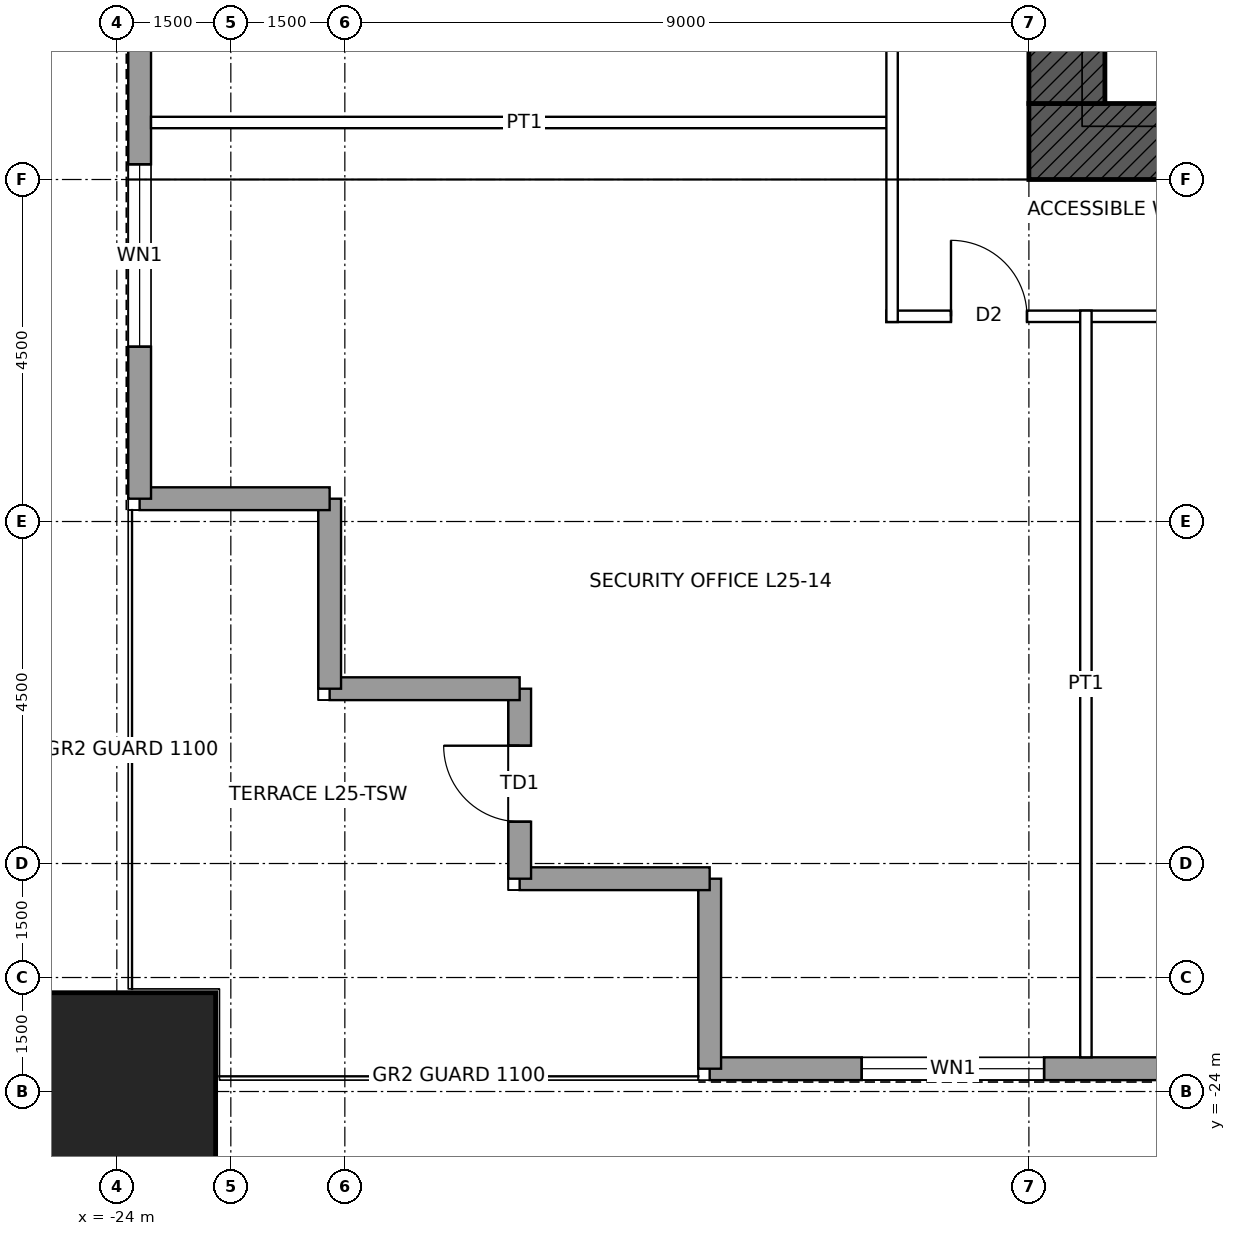
"""IFC4 building model, lengths in metres.
Left out: names, types, materials, properties, quantities, classifications, styles, units other than length and angle.
Written with IfcOpenShell. Run it as: python <this file> out.ifc"""

import sys

from ifc_helpers import new_model, si_unit, direction, frame, frame_2d, origin, origin_2d, place, context, subcontext, project, spatial, rectangle, hollow_rectangle, extrude, element, fill, save


model = new_model("IFC4")
c1 = context("Model", 3, precision=1e-05, world=origin(), true_north=direction((0.0, 1.0)))
c2 = subcontext(c1, "Body", "Model", "MODEL_VIEW")
j1 = project(units=[si_unit("LENGTHUNIT", "METRE"), si_unit("PLANEANGLEUNIT", "RADIAN")], contexts=[c1])
p1 = place(None, origin())
s1 = spatial("IfcSite", under=j1, at=p1, CompositionType="ELEMENT")
p2 = place(p1, origin())
s2 = spatial("IfcBuilding", under=s1, at=p2, CompositionType="ELEMENT")
p3 = place(p2, frame((0.0, 0.0, 126.9)))
s3 = spatial("IfcBuildingStorey", under=s2, at=p3, CompositionType="ELEMENT", Elevation=126.9)
p4 = place(p3, frame((-24.0, -24.0, 0.0), z_axis=(0.0, 0.0, 1.0), x_axis=(1.0, 0.0, 0.0)))
e1 = element("IfcColumn", 1, at=p4, inside=s3, PredefinedType="COLUMN", context=c2, shape_type="SweptSolid", body=[
    extrude(hollow_rectangle(XDim=2.6, YDim=2.6, WallThickness=0.13, at=origin_2d()), origin(), (0.0, 0.0, 1.0), 4.5),
])
p5 = place(p3, frame((12.0, -11.5, 0.0), z_axis=(0.0, 0.0, 1.0), x_axis=(-1.0, 0.0, 0.0)))
e2 = element("IfcWall", 2, at=p5, inside=s3, PredefinedType="SHEAR", context=c2, shape_type="SweptSolid", body=[
    extrude(rectangle(XDim=24.0, YDim=1.0, at=frame_2d((12.0, 0.0))), origin(), (0.0, 0.0, 1.0), 4.5),
])
p6 = place(p5, frame((11.5, 0.0, 0.0)))
e3 = element("IfcOpeningElement", 3, at=p6, cuts=e2, PredefinedType="OPENING", context=c2, shape_type="SweptSolid", body=[
    extrude(rectangle(XDim=1.0, YDim=2.1, at=frame_2d((0.5, 1.05))), frame((0.0, 0.51, 0.0), z_axis=(0.0, -1.0, 0.0), x_axis=(1.0, 0.0, 0.0)), (0.0, 0.0, 1.0), 1.02),
])
p7 = place(p5, frame((1.0, 0.0, 0.0)))
e4 = element("IfcOpeningElement", 4, at=p7, cuts=e2, PredefinedType="OPENING", context=c2, shape_type="SweptSolid", body=[
    extrude(rectangle(XDim=1.0, YDim=2.4, at=frame_2d((0.5, 1.2))), frame((0.0, 0.51, 0.0), z_axis=(0.0, -1.0, 0.0), x_axis=(1.0, 0.0, 0.0)), (0.0, 0.0, 1.0), 1.02),
])
p8 = place(p3, frame((-11.5, -11.0, 0.0), z_axis=(0.0, 0.0, 1.0), x_axis=(0.0, 1.0, 0.0)))
e5 = element("IfcWall", 5, at=p8, inside=s3, PredefinedType="SHEAR", context=c2, shape_type="SweptSolid", body=[
    extrude(rectangle(XDim=22.0, YDim=1.0, at=frame_2d((11.0, 0.0))), origin(), (0.0, 0.0, 1.0), 4.5),
])
p9 = place(p8, frame((10.5, 0.0, 0.0)))
e6 = element("IfcOpeningElement", 6, at=p9, cuts=e5, PredefinedType="OPENING", context=c2, shape_type="SweptSolid", body=[
    extrude(rectangle(XDim=1.0, YDim=2.4, at=frame_2d((0.5, 1.2))), frame((0.0, 0.51, 0.0), z_axis=(0.0, -1.0, 0.0), x_axis=(1.0, 0.0, 0.0)), (0.0, 0.0, 1.0), 1.02),
])
p10 = place(p3, frame((16.2, -23.7, 0.0), z_axis=(0.0, 0.0, 1.0), x_axis=(-1.0, 0.0, 0.0)))
e7 = element("IfcWall", 7, at=p10, inside=s3, PredefinedType="SOLIDWALL", context=c2, shape_type="SweptSolid", body=[
    extrude(rectangle(XDim=32.4, YDim=0.3, at=frame_2d((16.2, 0.0))), origin(), (0.0, 0.0, 1.0), 4.3),
])
p11 = place(p10, frame((2.0, 0.0, 1.0)))
e8 = element("IfcOpeningElement", 8, at=p11, cuts=e7, PredefinedType="OPENING", context=c2, shape_type="SweptSolid", body=[
    extrude(rectangle(XDim=2.4, YDim=1.2, at=frame_2d((1.2, 0.6))), frame((0.0, 0.16, 0.0), z_axis=(0.0, -1.0, 0.0), x_axis=(1.0, 0.0, 0.0)), (0.0, 0.0, 1.0), 0.32),
])
p12 = place(p10, frame((7.25, 0.0, 1.0)))
e9 = element("IfcOpeningElement", 9, at=p12, cuts=e7, PredefinedType="OPENING", context=c2, shape_type="SweptSolid", body=[
    extrude(rectangle(XDim=1.8, YDim=1.2, at=frame_2d((0.9, 0.6))), frame((0.0, 0.16, 0.0), z_axis=(0.0, -1.0, 0.0), x_axis=(1.0, 0.0, 0.0)), (0.0, 0.0, 1.0), 0.32),
])
p13 = place(p10, frame((9.5, 0.0, 1.0)))
e10 = element("IfcOpeningElement", 10, at=p13, cuts=e7, PredefinedType="OPENING", context=c2, shape_type="SweptSolid", body=[
    extrude(rectangle(XDim=2.4, YDim=1.2, at=frame_2d((1.2, 0.6))), frame((0.0, 0.16, 0.0), z_axis=(0.0, -1.0, 0.0), x_axis=(1.0, 0.0, 0.0)), (0.0, 0.0, 1.0), 0.32),
])
p14 = place(p10, frame((13.0, 0.0, 1.0)))
e11 = element("IfcOpeningElement", 11, at=p14, cuts=e7, PredefinedType="OPENING", context=c2, shape_type="SweptSolid", body=[
    extrude(rectangle(XDim=2.4, YDim=1.2, at=frame_2d((1.2, 0.6))), frame((0.0, 0.16, 0.0), z_axis=(0.0, -1.0, 0.0), x_axis=(1.0, 0.0, 0.0)), (0.0, 0.0, 1.0), 0.32),
])
p15 = place(p10, frame((17.0, 0.0, 1.0)))
e12 = element("IfcOpeningElement", 12, at=p15, cuts=e7, PredefinedType="OPENING", context=c2, shape_type="SweptSolid", body=[
    extrude(rectangle(XDim=2.4, YDim=1.2, at=frame_2d((1.2, 0.6))), frame((0.0, 0.16, 0.0), z_axis=(0.0, -1.0, 0.0), x_axis=(1.0, 0.0, 0.0)), (0.0, 0.0, 1.0), 0.32),
])
p16 = place(p10, frame((20.5, 0.0, 1.0)))
e13 = element("IfcOpeningElement", 13, at=p16, cuts=e7, PredefinedType="OPENING", context=c2, shape_type="SweptSolid", body=[
    extrude(rectangle(XDim=2.4, YDim=1.2, at=frame_2d((1.2, 0.6))), frame((0.0, 0.16, 0.0), z_axis=(0.0, -1.0, 0.0), x_axis=(1.0, 0.0, 0.0)), (0.0, 0.0, 1.0), 0.32),
])
p17 = place(p10, frame((23.35, 0.0, 1.0)))
e14 = element("IfcOpeningElement", 14, at=p17, cuts=e7, PredefinedType="OPENING", context=c2, shape_type="SweptSolid", body=[
    extrude(rectangle(XDim=1.8, YDim=1.2, at=frame_2d((0.9, 0.6))), frame((0.0, 0.16, 0.0), z_axis=(0.0, -1.0, 0.0), x_axis=(1.0, 0.0, 0.0)), (0.0, 0.0, 1.0), 0.32),
])
p18 = place(p10, frame((28.0, 0.0, 1.0)))
e15 = element("IfcOpeningElement", 15, at=p18, cuts=e7, PredefinedType="OPENING", context=c2, shape_type="SweptSolid", body=[
    extrude(rectangle(XDim=2.4, YDim=1.2, at=frame_2d((1.2, 0.6))), frame((0.0, 0.16, 0.0), z_axis=(0.0, -1.0, 0.0), x_axis=(1.0, 0.0, 0.0)), (0.0, 0.0, 1.0), 0.32),
])
for number, where, z_axis, x_axis in (
    (16, (-16.2, -23.7, 0.0), (0.0, 0.0, 1.0), (0.0, 1.0, 0.0)),
    (17, (-16.2, -21.2, 0.0), (0.0, 0.0, 1.0), (-1.0, 0.0, 0.0)),
):
    element("IfcWall", number, at=place(p3, frame(where, z_axis=z_axis, x_axis=x_axis)), inside=s3, PredefinedType="SOLIDWALL", context=c2, shape_type="SweptSolid", body=[
        extrude(rectangle(XDim=2.5, YDim=0.3, at=frame_2d((1.25, 0.0))), origin(), (0.0, 0.0, 1.0), 4.3),
    ])
p19 = place(p3, frame((-18.7, -21.2, 0.0), z_axis=(0.0, 0.0, 1.0), x_axis=(0.0, 1.0, 0.0)))
e18 = element("IfcWall", 18, at=p19, inside=s3, PredefinedType="SOLIDWALL", context=c2, shape_type="SweptSolid", body=[
    extrude(rectangle(XDim=2.5, YDim=0.3, at=frame_2d((1.25, 0.0))), origin(), (0.0, 0.0, 1.0), 4.3),
])
p20 = place(p19, frame((0.75, 0.0, 0.0)))
e19 = element("IfcOpeningElement", 19, at=p20, cuts=e18, PredefinedType="OPENING", context=c2, shape_type="SweptSolid", body=[
    extrude(rectangle(XDim=1.0, YDim=2.4, at=frame_2d((0.5, 1.2))), frame((0.0, 0.16, 0.0), z_axis=(0.0, -1.0, 0.0), x_axis=(1.0, 0.0, 0.0)), (0.0, 0.0, 1.0), 0.32),
])
for number, where, z_axis, x_axis in (
    (20, (-18.7, -18.7, 0.0), (0.0, 0.0, 1.0), (-1.0, 0.0, 0.0)),
    (21, (-21.2, -18.7, 0.0), (0.0, 0.0, 1.0), (0.0, 1.0, 0.0)),
    (22, (-21.2, -16.2, 0.0), (0.0, 0.0, 1.0), (-1.0, 0.0, 0.0)),
):
    element("IfcWall", number, at=place(p3, frame(where, z_axis=z_axis, x_axis=x_axis)), inside=s3, PredefinedType="SOLIDWALL", context=c2, shape_type="SweptSolid", body=[
        extrude(rectangle(XDim=2.5, YDim=0.3, at=frame_2d((1.25, 0.0))), origin(), (0.0, 0.0, 1.0), 4.3),
    ])
p21 = place(p3, frame((-23.7, -16.2, 0.0), z_axis=(0.0, 0.0, 1.0), x_axis=(0.0, 1.0, 0.0)))
e23 = element("IfcWall", 23, at=p21, inside=s3, PredefinedType="SOLIDWALL", context=c2, shape_type="SweptSolid", body=[
    extrude(rectangle(XDim=32.4, YDim=0.3, at=frame_2d((16.2, 0.0))), origin(), (0.0, 0.0, 1.0), 4.3),
])
p22 = place(p21, frame((2.0, 0.0, 1.0)))
e24 = element("IfcOpeningElement", 24, at=p22, cuts=e23, PredefinedType="OPENING", context=c2, shape_type="SweptSolid", body=[
    extrude(rectangle(XDim=2.4, YDim=1.2, at=frame_2d((1.2, 0.6))), frame((0.0, 0.16, 0.0), z_axis=(0.0, -1.0, 0.0), x_axis=(1.0, 0.0, 0.0)), (0.0, 0.0, 1.0), 0.32),
])
p23 = place(p21, frame((7.25, 0.0, 1.0)))
e25 = element("IfcOpeningElement", 25, at=p23, cuts=e23, PredefinedType="OPENING", context=c2, shape_type="SweptSolid", body=[
    extrude(rectangle(XDim=2.4, YDim=1.2, at=frame_2d((1.2, 0.6))), frame((0.0, 0.16, 0.0), z_axis=(0.0, -1.0, 0.0), x_axis=(1.0, 0.0, 0.0)), (0.0, 0.0, 1.0), 0.32),
])
p24 = place(p21, frame((9.95, 0.0, 1.0)))
e26 = element("IfcOpeningElement", 26, at=p24, cuts=e23, PredefinedType="OPENING", context=c2, shape_type="SweptSolid", body=[
    extrude(rectangle(XDim=2.4, YDim=1.2, at=frame_2d((1.2, 0.6))), frame((0.0, 0.16, 0.0), z_axis=(0.0, -1.0, 0.0), x_axis=(1.0, 0.0, 0.0)), (0.0, 0.0, 1.0), 0.32),
])
p25 = place(p21, frame((13.0, 0.0, 1.0)))
e27 = element("IfcOpeningElement", 27, at=p25, cuts=e23, PredefinedType="OPENING", context=c2, shape_type="SweptSolid", body=[
    extrude(rectangle(XDim=2.4, YDim=1.2, at=frame_2d((1.2, 0.6))), frame((0.0, 0.16, 0.0), z_axis=(0.0, -1.0, 0.0), x_axis=(1.0, 0.0, 0.0)), (0.0, 0.0, 1.0), 0.32),
])
p26 = place(p21, frame((17.0, 0.0, 1.0)))
e28 = element("IfcOpeningElement", 28, at=p26, cuts=e23, PredefinedType="OPENING", context=c2, shape_type="SweptSolid", body=[
    extrude(rectangle(XDim=2.4, YDim=1.2, at=frame_2d((1.2, 0.6))), frame((0.0, 0.16, 0.0), z_axis=(0.0, -1.0, 0.0), x_axis=(1.0, 0.0, 0.0)), (0.0, 0.0, 1.0), 0.32),
])
p27 = place(p21, frame((20.05, 0.0, 1.0)))
e29 = element("IfcOpeningElement", 29, at=p27, cuts=e23, PredefinedType="OPENING", context=c2, shape_type="SweptSolid", body=[
    extrude(rectangle(XDim=2.4, YDim=1.2, at=frame_2d((1.2, 0.6))), frame((0.0, 0.16, 0.0), z_axis=(0.0, -1.0, 0.0), x_axis=(1.0, 0.0, 0.0)), (0.0, 0.0, 1.0), 0.32),
])
p28 = place(p21, frame((22.75, 0.0, 1.0)))
e30 = element("IfcOpeningElement", 30, at=p28, cuts=e23, PredefinedType="OPENING", context=c2, shape_type="SweptSolid", body=[
    extrude(rectangle(XDim=2.4, YDim=1.2, at=frame_2d((1.2, 0.6))), frame((0.0, 0.16, 0.0), z_axis=(0.0, -1.0, 0.0), x_axis=(1.0, 0.0, 0.0)), (0.0, 0.0, 1.0), 0.32),
])
p29 = place(p21, frame((28.0, 0.0, 1.0)))
e31 = element("IfcOpeningElement", 31, at=p29, cuts=e23, PredefinedType="OPENING", context=c2, shape_type="SweptSolid", body=[
    extrude(rectangle(XDim=2.4, YDim=1.2, at=frame_2d((1.2, 0.6))), frame((0.0, 0.16, 0.0), z_axis=(0.0, -1.0, 0.0), x_axis=(1.0, 0.0, 0.0)), (0.0, 0.0, 1.0), 0.32),
])
p30 = place(p3, frame((-13.875, -13.8, 0.0), z_axis=(0.0, 0.0, 1.0), x_axis=(1.0, 0.0, 0.0)))
e32 = element("IfcWall", 32, at=p30, inside=s3, PredefinedType="PARTITIONING", context=c2, shape_type="SweptSolid", body=[
    extrude(rectangle(XDim=27.75, YDim=0.15, at=frame_2d((13.875, 0.0))), origin(), (0.0, 0.0, 1.0), 4.3),
])
p31 = place(p30, frame((20.475, 0.0, 0.0)))
e33 = element("IfcOpeningElement", 33, at=p31, cuts=e32, PredefinedType="OPENING", context=c2, shape_type="SweptSolid", body=[
    extrude(rectangle(XDim=1.8, YDim=2.4, at=frame_2d((0.9, 1.2))), frame((0.0, 0.085, 0.0), z_axis=(0.0, -1.0, 0.0), x_axis=(1.0, 0.0, 0.0)), (0.0, 0.0, 1.0), 0.17),
])
p32 = place(p30, frame((10.525, 0.0, 0.0)))
e34 = element("IfcOpeningElement", 34, at=p32, cuts=e32, PredefinedType="OPENING", context=c2, shape_type="SweptSolid", body=[
    extrude(rectangle(XDim=1.8, YDim=2.4, at=frame_2d((0.9, 1.2))), frame((0.0, 0.085, 0.0), z_axis=(0.0, -1.0, 0.0), x_axis=(1.0, 0.0, 0.0)), (0.0, 0.0, 1.0), 0.17),
])
p33 = place(p30, frame((5.475, 0.0, 0.0)))
e35 = element("IfcOpeningElement", 35, at=p33, cuts=e32, PredefinedType="OPENING", context=c2, shape_type="SweptSolid", body=[
    extrude(rectangle(XDim=1.8, YDim=2.4, at=frame_2d((0.9, 1.2))), frame((0.0, 0.085, 0.0), z_axis=(0.0, -1.0, 0.0), x_axis=(1.0, 0.0, 0.0)), (0.0, 0.0, 1.0), 0.17),
])
p34 = place(p30, frame((25.9, 0.0, 0.0)))
e36 = element("IfcOpeningElement", 36, at=p34, cuts=e32, PredefinedType="OPENING", context=c2, shape_type="SweptSolid", body=[
    extrude(rectangle(XDim=1.0, YDim=2.1, at=frame_2d((0.5, 1.05))), frame((0.0, 0.085, 0.0), z_axis=(0.0, -1.0, 0.0), x_axis=(1.0, 0.0, 0.0)), (0.0, 0.0, 1.0), 0.17),
])
p35 = place(p30, frame((0.85, 0.0, 0.0)))
e37 = element("IfcOpeningElement", 37, at=p35, cuts=e32, PredefinedType="OPENING", context=c2, shape_type="SweptSolid", body=[
    extrude(rectangle(XDim=1.0, YDim=2.1, at=frame_2d((0.5, 1.05))), frame((0.0, 0.085, 0.0), z_axis=(0.0, -1.0, 0.0), x_axis=(1.0, 0.0, 0.0)), (0.0, 0.0, 1.0), 0.17),
])
p36 = place(p3, frame((-23.55, -11.25, 0.0), z_axis=(0.0, 0.0, 1.0), x_axis=(1.0, 0.0, 0.0)))
e38 = element("IfcWall", 38, at=p36, inside=s3, PredefinedType="PARTITIONING", context=c2, shape_type="SweptSolid", body=[
    extrude(rectangle(XDim=9.825, YDim=0.15, at=frame_2d((4.913, 0.0))), origin(), (0.0, 0.0, 1.0), 3.431),
])
p37 = place(p3, frame((-13.8, -13.875, 0.0), z_axis=(0.0, 0.0, 1.0), x_axis=(0.0, 1.0, 0.0)))
e39 = element("IfcWall", 39, at=p37, inside=s3, PredefinedType="PARTITIONING", context=c2, shape_type="SweptSolid", body=[
    extrude(rectangle(XDim=27.75, YDim=0.15, at=frame_2d((13.875, 0.0))), origin(), (0.0, 0.0, 1.0), 4.3),
])
p38 = place(p37, frame((7.75, 0.0, 0.0)))
e40 = element("IfcOpeningElement", 40, at=p38, cuts=e39, PredefinedType="OPENING", context=c2, shape_type="SweptSolid", body=[
    extrude(rectangle(XDim=1.0, YDim=2.1, at=frame_2d((0.5, 1.05))), frame((0.0, 0.085, 0.0), z_axis=(0.0, -1.0, 0.0), x_axis=(1.0, 0.0, 0.0)), (0.0, 0.0, 1.0), 0.17),
])
p39 = place(p37, frame((18.6, 0.0, 0.0)))
e41 = element("IfcOpeningElement", 41, at=p39, cuts=e39, PredefinedType="OPENING", context=c2, shape_type="SweptSolid", body=[
    extrude(rectangle(XDim=1.8, YDim=2.4, at=frame_2d((0.9, 1.2))), frame((0.0, 0.085, 0.0), z_axis=(0.0, -1.0, 0.0), x_axis=(1.0, 0.0, 0.0)), (0.0, 0.0, 1.0), 0.17),
])
p40 = place(p3, frame((-11.25, -23.55, 0.0), z_axis=(0.0, 0.0, 1.0), x_axis=(0.0, 1.0, 0.0)))
e42 = element("IfcWall", 42, at=p40, inside=s3, PredefinedType="PARTITIONING", context=c2, shape_type="SweptSolid", body=[
    extrude(rectangle(XDim=9.825, YDim=0.15, at=frame_2d((4.913, 0.0))), origin(), (0.0, 0.0, 1.0), 3.431),
])
p41 = place(p18, origin())
e43 = element("IfcWindow", 43, at=p41, inside=s3, PartitioningType="SINGLE_PANEL", PredefinedType="WINDOW", context=c2, shape_type="SweptSolid", body=[
    extrude(rectangle(XDim=2.4, YDim=1.2, at=frame_2d((1.2, 0.6))), frame((0.0, 0.03, 0.0), z_axis=(0.0, -1.0, 0.0), x_axis=(1.0, 0.0, 0.0)), (0.0, 0.0, 1.0), 0.06),
])
fill(e15, e43)
p42 = place(p20, origin())
e44 = element("IfcDoor", 44, at=p42, inside=s3, OperationType="SINGLE_SWING_RIGHT", PredefinedType="DOOR", context=c2, shape_type="SweptSolid", body=[
    extrude(rectangle(XDim=1.0, YDim=2.4, at=frame_2d((0.5, 1.2))), frame((0.0, 0.025, 0.0), z_axis=(0.0, -1.0, 0.0), x_axis=(1.0, 0.0, 0.0)), (0.0, 0.0, 1.0), 0.05),
])
fill(e19, e44)
p43 = place(p22, origin())
e45 = element("IfcWindow", 45, at=p43, inside=s3, PartitioningType="SINGLE_PANEL", PredefinedType="WINDOW", context=c2, shape_type="SweptSolid", body=[
    extrude(rectangle(XDim=2.4, YDim=1.2, at=frame_2d((1.2, 0.6))), frame((0.0, 0.03, 0.0), z_axis=(0.0, -1.0, 0.0), x_axis=(1.0, 0.0, 0.0)), (0.0, 0.0, 1.0), 0.06),
])
fill(e24, e45)
p44 = place(p35, origin())
e46 = element("IfcDoor", 46, at=p44, inside=s3, OperationType="SINGLE_SWING_LEFT", PredefinedType="DOOR", context=c2, shape_type="SweptSolid", body=[
    extrude(rectangle(XDim=1.0, YDim=2.1, at=frame_2d((0.5, 1.05))), frame((0.0, 0.025, 0.0), z_axis=(0.0, -1.0, 0.0), x_axis=(1.0, 0.0, 0.0)), (0.0, 0.0, 1.0), 0.05),
])
fill(e37, e46)
save(model, sys.argv[1])
